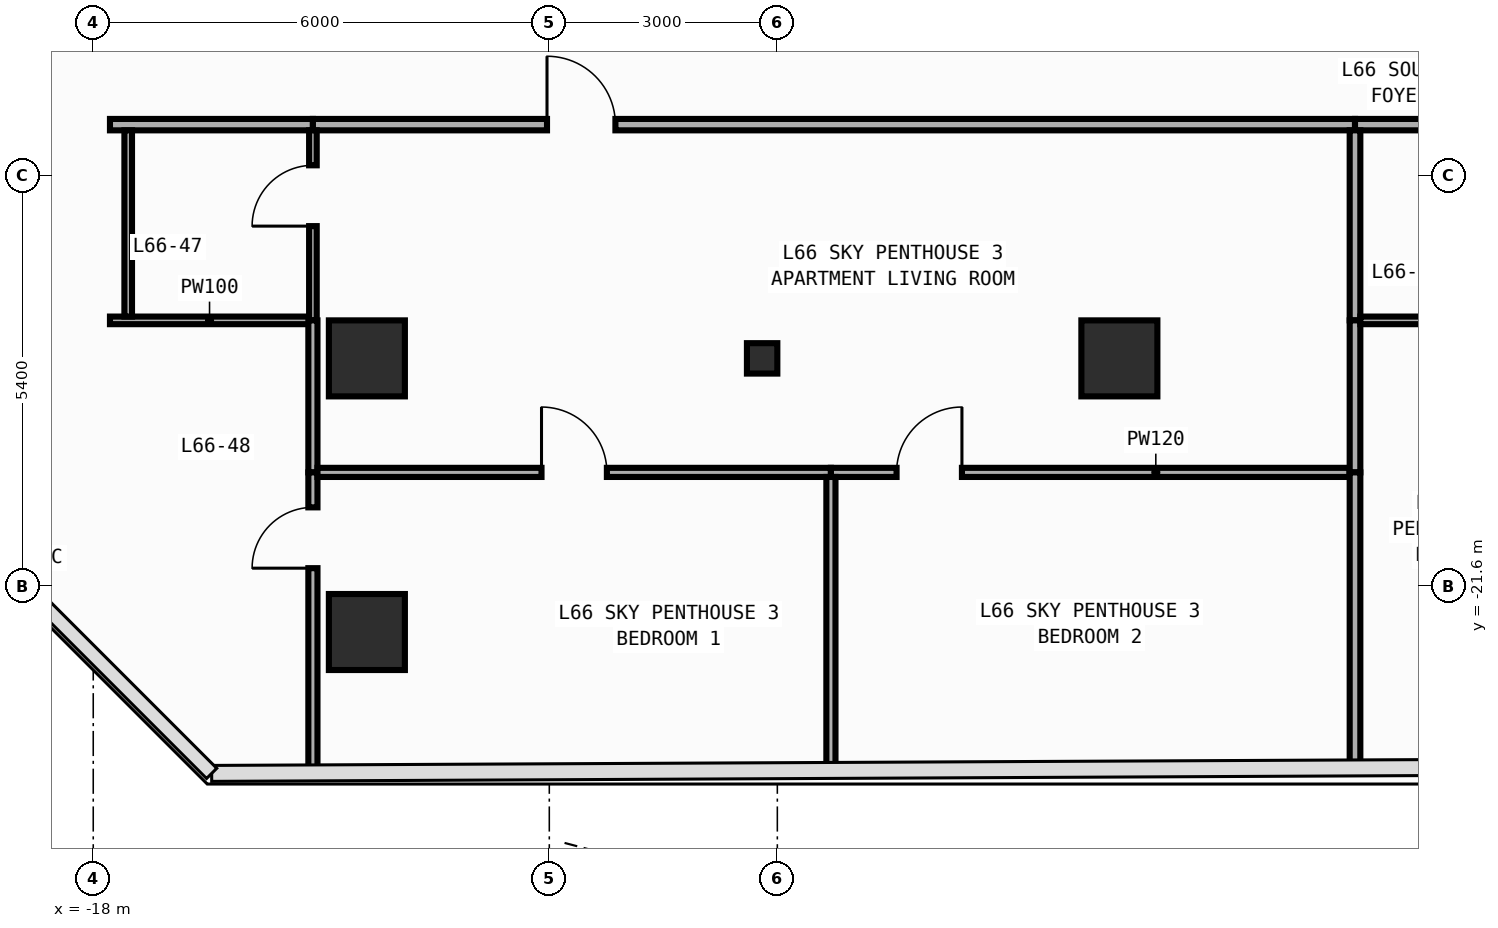
"""IFC4 building model, lengths in metres.
Left out: names, types, materials, properties, quantities, classifications, styles, units other than length and angle.
Written with IfcOpenShell. Run it as: python <this file> out.ifc"""

import sys

from ifc_helpers import new_model, si_unit, direction, frame, frame_2d, origin, origin_2d, place, context, subcontext, project, spatial, rectangle, circle, i_section, extrude, element, fill, save


model = new_model("IFC4")
c1 = context("Model", 3, precision=1e-05, world=origin(), true_north=direction((0.0, 1.0)))
c2 = subcontext(c1, "Body", "Model", "MODEL_VIEW")
j1 = project(units=[si_unit("LENGTHUNIT", "METRE"), si_unit("PLANEANGLEUNIT", "RADIAN")], contexts=[c1])
p1 = place(None, origin())
s1 = spatial("IfcSite", under=j1, at=p1, CompositionType="ELEMENT")
p2 = place(p1, origin())
s2 = spatial("IfcBuilding", under=s1, at=p2, CompositionType="ELEMENT")
p3 = place(p2, frame((0.0, 0.0, 277.6)))
s3 = spatial("IfcBuildingStorey", under=s2, at=p3, CompositionType="ELEMENT", Elevation=277.6)
p4 = place(p3, frame((-9.2, -18.6, 0.0), z_axis=(0.0, 0.0, 1.0), x_axis=(1.0, 0.0, 0.0)))
e1 = element("IfcColumn", 1, at=p4, inside=s3, PredefinedType="COLUMN", context=c2, shape_type="SweptSolid", body=[
    extrude(i_section(OverallWidth=0.4, OverallDepth=0.4, WebThickness=0.013, FlangeThickness=0.021, FilletRadius=0.022, at=origin_2d()), origin(), (0.0, 0.0, 1.0), 3.8),
])
for number, where, z_axis, x_axis in (
    (2, (-14.4, -18.6, 0.0), (0.0, 0.0, 1.0), (1.0, 0.0, 0.0)),
    (3, (-4.5, -18.6, 0.0), (0.0, 0.0, 1.0), (1.0, 0.0, 0.0)),
    (4, (-14.4, -22.2, 0.0), (0.0, 0.0, 1.0), (1.0, 0.0, 0.0)),
):
    element("IfcColumn", number, at=place(p3, frame(where, z_axis=z_axis, x_axis=x_axis)), inside=s3, PredefinedType="COLUMN", context=c2, shape_type="SweptSolid", body=[
        extrude(circle(Radius=0.5, at=origin_2d()), origin(), (0.0, 0.0, 1.0), 3.8),
    ])
p5 = place(p3, frame((-17.78, -15.525, 0.0), z_axis=(0.0, 0.0, 1.0), x_axis=(1.0, 0.0, 0.0)))
e5 = element("IfcWall", 5, at=p5, inside=s3, PredefinedType="PARTITIONING", context=c2, shape_type="SweptSolid", body=[
    extrude(rectangle(XDim=2.67, YDim=0.15, at=frame_2d((1.335, 0.0))), origin(), (0.0, 0.0, 1.0), 3.54),
])
p6 = place(p3, frame((-15.11, -15.525, 0.0), z_axis=(0.0, 0.0, 1.0), x_axis=(1.0, 0.0, 0.0)))
e6 = element("IfcWall", 6, at=p6, inside=s3, PredefinedType="PARTITIONING", context=c2, shape_type="SweptSolid", body=[
    extrude(rectangle(XDim=13.71, YDim=0.15, at=frame_2d((6.855, 0.0))), origin(), (0.0, 0.0, 1.0), 3.54),
])
p7 = place(p6, frame((3.08, 0.0, 0.0)))
e7 = element("IfcOpeningElement", 7, at=p7, cuts=e6, PredefinedType="OPENING", context=c2, shape_type="SweptSolid", body=[
    extrude(rectangle(XDim=0.9, YDim=2.15, at=frame_2d((0.45, 1.075))), frame((0.0, 0.085, 0.0), z_axis=(0.0, -1.0, 0.0), x_axis=(1.0, 0.0, 0.0)), (0.0, 0.0, 1.0), 0.17),
])
p8 = place(p3, frame((-1.4, -15.525, 0.0), z_axis=(0.0, 0.0, 1.0), x_axis=(1.0, 0.0, 0.0)))
e8 = element("IfcWall", 8, at=p8, inside=s3, PredefinedType="PARTITIONING", context=c2, shape_type="SweptSolid", body=[
    extrude(rectangle(XDim=2.59, YDim=0.15, at=frame_2d((1.295, 0.0))), origin(), (0.0, 0.0, 1.0), 3.54),
])
p9 = place(p3, frame((-17.78, -18.1, 0.0), z_axis=(0.0, 0.0, 1.0), x_axis=(1.0, 0.0, 0.0)))
e9 = element("IfcWall", 9, at=p9, inside=s3, PredefinedType="PARTITIONING", context=c2, shape_type="SweptSolid", body=[
    extrude(rectangle(XDim=2.62, YDim=0.1, at=frame_2d((1.31, 0.0))), origin(), (0.0, 0.0, 1.0), 3.54),
])
p10 = place(p3, frame((-15.11, -18.1, 0.0), z_axis=(0.0, 0.0, 1.0), x_axis=(0.0, 1.0, 0.0)))
e10 = element("IfcWall", 10, at=p10, inside=s3, PredefinedType="PARTITIONING", context=c2, shape_type="SweptSolid", body=[
    extrude(rectangle(XDim=2.5, YDim=0.1, at=frame_2d((1.25, 0.0))), origin(), (0.0, 0.0, 1.0), 3.54),
])
p11 = place(p10, frame((1.24, 0.0, 0.0)))
e11 = element("IfcOpeningElement", 11, at=p11, cuts=e10, PredefinedType="OPENING", context=c2, shape_type="SweptSolid", body=[
    extrude(rectangle(XDim=0.8, YDim=2.1, at=frame_2d((0.4, 1.05))), frame((0.0, 0.06, 0.0), z_axis=(0.0, -1.0, 0.0), x_axis=(1.0, 0.0, 0.0)), (0.0, 0.0, 1.0), 0.12),
])
p12 = place(p3, frame((-15.11, -20.1, 0.0), z_axis=(0.0, 0.0, 1.0), x_axis=(0.0, 1.0, 0.0)))
e12 = element("IfcWall", 12, at=p12, inside=s3, PredefinedType="PARTITIONING", context=c2, shape_type="SweptSolid", body=[
    extrude(rectangle(XDim=2.0, YDim=0.12, at=frame_2d((1.0, 0.0))), origin(), (0.0, 0.0, 1.0), 3.54),
])
p13 = place(p3, frame((-15.11, -24.049, 0.0), z_axis=(0.0, 0.0, 1.0), x_axis=(0.0, 1.0, 0.0)))
e13 = element("IfcWall", 13, at=p13, inside=s3, PredefinedType="PARTITIONING", context=c2, shape_type="SweptSolid", body=[
    extrude(rectangle(XDim=3.948, YDim=0.12, at=frame_2d((1.974, 0.0))), origin(), (0.0, 0.0, 1.0), 3.54),
])
p14 = place(p13, frame((2.689, 0.0, 0.0)))
e14 = element("IfcOpeningElement", 14, at=p14, cuts=e13, PredefinedType="OPENING", context=c2, shape_type="SweptSolid", body=[
    extrude(rectangle(XDim=0.8, YDim=2.1, at=frame_2d((0.4, 1.05))), frame((0.0, 0.07, 0.0), z_axis=(0.0, -1.0, 0.0), x_axis=(1.0, 0.0, 0.0)), (0.0, 0.0, 1.0), 0.14),
])
p15 = place(p3, frame((-15.05, -20.1, 0.0), z_axis=(0.0, 0.0, 1.0), x_axis=(1.0, 0.0, 0.0)))
e15 = element("IfcWall", 15, at=p15, inside=s3, PredefinedType="PARTITIONING", context=c2, shape_type="SweptSolid", body=[
    extrude(rectangle(XDim=6.755, YDim=0.12, at=frame_2d((3.377, 0.0))), origin(), (0.0, 0.0, 1.0), 3.54),
])
p16 = place(p15, frame((2.948, 0.0, 0.0)))
e16 = element("IfcOpeningElement", 16, at=p16, cuts=e15, PredefinedType="OPENING", context=c2, shape_type="SweptSolid", body=[
    extrude(rectangle(XDim=0.86, YDim=2.15, at=frame_2d((0.43, 1.075))), frame((0.0, 0.07, 0.0), z_axis=(0.0, -1.0, 0.0), x_axis=(1.0, 0.0, 0.0)), (0.0, 0.0, 1.0), 0.14),
])
p17 = place(p3, frame((-8.295, -20.1, 0.0), z_axis=(0.0, 0.0, 1.0), x_axis=(1.0, 0.0, 0.0)))
e17 = element("IfcWall", 17, at=p17, inside=s3, PredefinedType="PARTITIONING", context=c2, shape_type="SweptSolid", body=[
    extrude(rectangle(XDim=6.825, YDim=0.12, at=frame_2d((3.413, 0.0))), origin(), (0.0, 0.0, 1.0), 3.54),
])
p18 = place(p17, frame((0.864, 0.0, 0.0)))
e18 = element("IfcOpeningElement", 18, at=p18, cuts=e17, PredefinedType="OPENING", context=c2, shape_type="SweptSolid", body=[
    extrude(rectangle(XDim=0.86, YDim=2.15, at=frame_2d((0.43, 1.075))), frame((0.0, 0.07, 0.0), z_axis=(0.0, -1.0, 0.0), x_axis=(1.0, 0.0, 0.0)), (0.0, 0.0, 1.0), 0.14),
])
p19 = place(p3, frame((-1.4, -18.1, 0.0), z_axis=(0.0, 0.0, 1.0), x_axis=(0.0, 1.0, 0.0)))
e19 = element("IfcWall", 19, at=p19, inside=s3, PredefinedType="PARTITIONING", context=c2, shape_type="SweptSolid", body=[
    extrude(rectangle(XDim=2.5, YDim=0.14, at=frame_2d((1.25, 0.0))), origin(), (0.0, 0.0, 1.0), 3.54),
])
p20 = place(p3, frame((-1.4, -20.1, 0.0), z_axis=(0.0, 0.0, 1.0), x_axis=(0.0, 1.0, 0.0)))
e20 = element("IfcWall", 20, at=p20, inside=s3, PredefinedType="PARTITIONING", context=c2, shape_type="SweptSolid", body=[
    extrude(rectangle(XDim=2.0, YDim=0.14, at=frame_2d((1.0, 0.0))), origin(), (0.0, 0.0, 1.0), 3.54),
])
p21 = place(p3, frame((-8.295, -24.016, 0.0), z_axis=(0.0, 0.0, 1.0), x_axis=(0.0, 1.0, 0.0)))
e21 = element("IfcWall", 21, at=p21, inside=s3, PredefinedType="PARTITIONING", context=c2, shape_type="SweptSolid", body=[
    extrude(rectangle(XDim=3.856, YDim=0.12, at=frame_2d((1.928, 0.0))), origin(), (0.0, 0.0, 1.0), 3.54),
])
p22 = place(p3, frame((-1.4, -23.983, 0.0), z_axis=(0.0, 0.0, 1.0), x_axis=(0.0, 1.0, 0.0)))
e22 = element("IfcWall", 22, at=p22, inside=s3, PredefinedType="PARTITIONING", context=c2, shape_type="SweptSolid", body=[
    extrude(rectangle(XDim=3.883, YDim=0.14, at=frame_2d((1.941, 0.0))), origin(), (0.0, 0.0, 1.0), 3.54),
])
p23 = place(p3, frame((-1.33, -18.1, 0.0), z_axis=(0.0, 0.0, 1.0), x_axis=(1.0, 0.0, 0.0)))
e23 = element("IfcWall", 23, at=p23, inside=s3, PredefinedType="PARTITIONING", context=c2, shape_type="SweptSolid", body=[
    extrude(rectangle(XDim=2.47, YDim=0.1, at=frame_2d((1.235, 0.0))), origin(), (0.0, 0.0, 1.0), 3.54),
])
p24 = place(p3, frame((-17.54, -18.05, 0.0), z_axis=(0.0, 0.0, 1.0), x_axis=(0.0, 1.0, 0.0)))
e24 = element("IfcWall", 24, at=p24, inside=s3, PredefinedType="PARTITIONING", context=c2, shape_type="SweptSolid", body=[
    extrude(rectangle(XDim=2.45, YDim=0.1, at=frame_2d((1.225, 0.0))), origin(), (0.0, 0.0, 1.0), 3.54),
])
p25 = place(p7, origin())
e25 = element("IfcDoor", 25, at=p25, inside=s3, OperationType="SINGLE_SWING_LEFT", PredefinedType="DOOR", context=c2, shape_type="SweptSolid", body=[
    extrude(rectangle(XDim=0.9, YDim=2.15, at=frame_2d((0.45, 1.075))), frame((0.0, 0.025, 0.0), z_axis=(0.0, -1.0, 0.0), x_axis=(1.0, 0.0, 0.0)), (0.0, 0.0, 1.0), 0.05),
])
fill(e7, e25)
p26 = place(p11, origin())
e26 = element("IfcDoor", 26, at=p26, inside=s3, OperationType="SINGLE_SWING_LEFT", PredefinedType="DOOR", context=c2, shape_type="SweptSolid", body=[
    extrude(rectangle(XDim=0.8, YDim=2.1, at=frame_2d((0.4, 1.05))), frame((0.0, 0.025, 0.0), z_axis=(0.0, -1.0, 0.0), x_axis=(1.0, 0.0, 0.0)), (0.0, 0.0, 1.0), 0.05),
])
fill(e11, e26)
p27 = place(p16, origin())
e27 = element("IfcDoor", 27, at=p27, inside=s3, OperationType="SINGLE_SWING_LEFT", PredefinedType="DOOR", context=c2, shape_type="SweptSolid", body=[
    extrude(rectangle(XDim=0.86, YDim=2.15, at=frame_2d((0.43, 1.075))), frame((0.0, 0.025, 0.0), z_axis=(0.0, -1.0, 0.0), x_axis=(1.0, 0.0, 0.0)), (0.0, 0.0, 1.0), 0.05),
])
fill(e16, e27)
p28 = place(p18, origin())
e28 = element("IfcDoor", 28, at=p28, inside=s3, OperationType="SINGLE_SWING_RIGHT", PredefinedType="DOOR", context=c2, shape_type="SweptSolid", body=[
    extrude(rectangle(XDim=0.86, YDim=2.15, at=frame_2d((0.43, 1.075))), frame((0.0, 0.025, 0.0), z_axis=(0.0, -1.0, 0.0), x_axis=(1.0, 0.0, 0.0)), (0.0, 0.0, 1.0), 0.05),
])
fill(e18, e28)
p29 = place(p14, origin())
e29 = element("IfcDoor", 29, at=p29, inside=s3, OperationType="SINGLE_SWING_LEFT", PredefinedType="DOOR", context=c2, shape_type="SweptSolid", body=[
    extrude(rectangle(XDim=0.8, YDim=2.1, at=frame_2d((0.4, 1.05))), frame((0.0, 0.025, 0.0), z_axis=(0.0, -1.0, 0.0), x_axis=(1.0, 0.0, 0.0)), (0.0, 0.0, 1.0), 0.05),
])
fill(e14, e29)
save(model, sys.argv[1])
